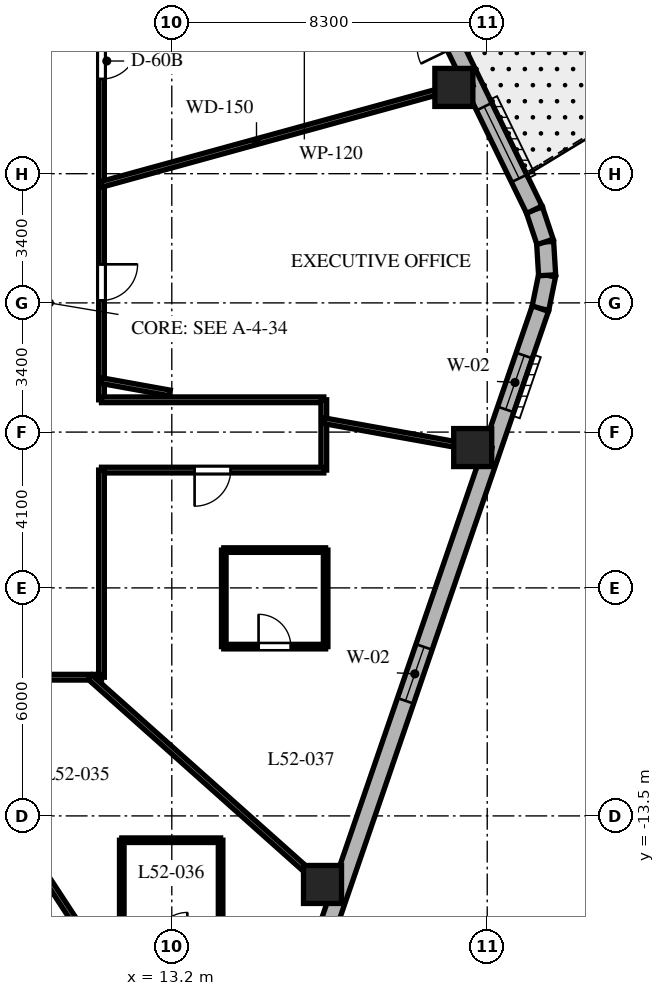
"""IFC4 building model, lengths in metres.
Left out: names, types, materials, properties, quantities, classifications, styles, units other than length and angle.
Written with IfcOpenShell. Run it as: python <this file> out.ifc"""

import sys

from ifc_helpers import new_model, si_unit, direction, frame, frame_2d, origin, origin_2d, place, context, subcontext, project, spatial, rectangle, extrude, element, fill, save


model = new_model("IFC4")
c1 = context("Model", 3, precision=1e-05, world=origin(), true_north=direction((0.0, 1.0)))
c2 = subcontext(c1, "Body", "Model", "MODEL_VIEW")
j1 = project(units=[si_unit("LENGTHUNIT", "METRE"), si_unit("PLANEANGLEUNIT", "RADIAN")], contexts=[c1])
p1 = place(None, origin())
s1 = spatial("IfcSite", under=j1, at=p1, CompositionType="ELEMENT")
p2 = place(p1, origin())
s2 = spatial("IfcBuilding", under=s1, at=p2, CompositionType="ELEMENT")
p3 = place(p2, frame((0.0, 0.0, 210.3)))
s3 = spatial("IfcBuildingStorey", under=s2, at=p3, CompositionType="ELEMENT", Elevation=210.3)
for number, where, z_axis, x_axis in (
    (1, (17.166, -15.304, 0.0), (0.0, 0.0, 1.0), (1.0, 0.0, 0.0)),
    (2, (21.118, -3.807, 0.0), (0.0, 0.0, 1.0), (1.0, 0.0, 0.0)),
    (3, (20.622, 5.67, 0.0), (0.0, 0.0, 1.0), (1.0, 0.0, 0.0)),
):
    element("IfcColumn", number, at=place(p3, frame(where, z_axis=z_axis, x_axis=x_axis)), inside=s3, PredefinedType="COLUMN", context=c2, shape_type="SweptSolid", body=[
        extrude(rectangle(XDim=1.0, YDim=1.0, at=origin_2d()), origin(), (0.0, 0.0, 1.0), 3.8),
    ])
p4 = place(p3, frame((22.898, -0.15, 0.0), z_axis=(0.0, 0.0, 1.0), x_axis=(0.199055826889, 0.979988151858, 0.0)))
e4 = element("IfcWall", 4, at=p4, inside=s3, PredefinedType="SOLIDWALL", context=c2, shape_type="SweptSolid", body=[
    extrude(rectangle(XDim=0.894, YDim=0.45, at=frame_2d((0.447, 0.0))), origin(), (0.0, 0.0, 1.0), 3.5),
])
p5 = place(p3, frame((23.076, 0.727, 0.0), z_axis=(0.0, 0.0, 1.0), x_axis=(-0.060805222108, 0.998149650586, 0.0)))
e5 = element("IfcWall", 5, at=p5, inside=s3, PredefinedType="SOLIDWALL", context=c2, shape_type="SweptSolid", body=[
    extrude(rectangle(XDim=0.879, YDim=0.45, at=frame_2d((0.44, 0.0))), origin(), (0.0, 0.0, 1.0), 3.5),
])
p6 = place(p3, frame((23.023, 1.604, 0.0), z_axis=(0.0, 0.0, 1.0), x_axis=(-0.316801227695, 0.948491951537, 0.0)))
e6 = element("IfcWall", 6, at=p6, inside=s3, PredefinedType="SOLIDWALL", context=c2, shape_type="SweptSolid", body=[
    extrude(rectangle(XDim=0.894, YDim=0.45, at=frame_2d((0.447, 0.0))), origin(), (0.0, 0.0, 1.0), 3.5),
])
p7 = place(p3, frame((16.324, -19.275, 0.0), z_axis=(0.0, 0.0, 1.0), x_axis=(0.325083142304, 0.945685439557, 0.0)))
e7 = element("IfcWall", 7, at=p7, inside=s3, PredefinedType="SOLIDWALL", context=c2, shape_type="SweptSolid", body=[
    extrude(rectangle(XDim=20.224, YDim=0.45, at=frame_2d((10.112, 0.0))), origin(), (0.0, 0.0, 1.0), 3.5),
])
p8 = place(p7, frame((1.253, 0.0, 0.8)))
e8 = element("IfcOpeningElement", 8, at=p8, cuts=e7, PredefinedType="OPENING", context=c2, shape_type="SweptSolid", body=[
    extrude(rectangle(XDim=1.5, YDim=1.8, at=frame_2d((0.75, 0.9))), frame((0.0, 0.235, 0.0), z_axis=(0.0, -1.0, 0.0), x_axis=(1.0, 0.0, 0.0)), (0.0, 0.0, 1.0), 0.47),
])
p9 = place(p7, frame((9.309, 0.0, 0.8)))
e9 = element("IfcOpeningElement", 9, at=p9, cuts=e7, PredefinedType="OPENING", context=c2, shape_type="SweptSolid", body=[
    extrude(rectangle(XDim=1.5, YDim=1.8, at=frame_2d((0.75, 0.9))), frame((0.0, 0.235, 0.0), z_axis=(0.0, -1.0, 0.0), x_axis=(1.0, 0.0, 0.0)), (0.0, 0.0, 1.0), 0.47),
])
p10 = place(p7, frame((17.418, 0.0, 0.8)))
e10 = element("IfcOpeningElement", 10, at=p10, cuts=e7, PredefinedType="OPENING", context=c2, shape_type="SweptSolid", body=[
    extrude(rectangle(XDim=1.5, YDim=1.8, at=frame_2d((0.75, 0.9))), frame((0.0, 0.235, 0.0), z_axis=(0.0, -1.0, 0.0), x_axis=(1.0, 0.0, 0.0)), (0.0, 0.0, 1.0), 0.47),
])
p11 = place(p3, frame((22.74, 2.452, 0.0), z_axis=(0.0, 0.0, 1.0), x_axis=(-0.437753424814, 0.899095066755, 0.0)))
e11 = element("IfcWall", 11, at=p11, inside=s3, PredefinedType="SOLIDWALL", context=c2, shape_type="SweptSolid", body=[
    extrude(rectangle(XDim=19.137, YDim=0.45, at=frame_2d((9.569, 0.0))), origin(), (0.0, 0.0, 1.0), 3.5),
])
p12 = place(p11, frame((4.763, 0.0, 0.0)))
e12 = element("IfcOpeningElement", 12, at=p12, cuts=e11, PredefinedType="OPENING", context=c2, shape_type="SweptSolid", body=[
    extrude(rectangle(XDim=1.0, YDim=2.15, at=frame_2d((0.5, 1.075))), frame((0.0, 0.235, 0.0), z_axis=(0.0, -1.0, 0.0), x_axis=(1.0, 0.0, 0.0)), (0.0, 0.0, 1.0), 0.47),
])
p13 = place(p11, frame((8.57, 0.0, 0.8)))
e13 = element("IfcOpeningElement", 13, at=p13, cuts=e11, PredefinedType="OPENING", context=c2, shape_type="SweptSolid", body=[
    extrude(rectangle(XDim=2.1, YDim=1.85, at=frame_2d((1.05, 0.925))), frame((0.0, 0.235, 0.0), z_axis=(0.0, -1.0, 0.0), x_axis=(1.0, 0.0, 0.0)), (0.0, 0.0, 1.0), 0.47),
])
p14 = place(p11, frame((16.173, 0.0, 0.8)))
e14 = element("IfcOpeningElement", 14, at=p14, cuts=e11, PredefinedType="OPENING", context=c2, shape_type="SweptSolid", body=[
    extrude(rectangle(XDim=2.1, YDim=1.85, at=frame_2d((1.05, 0.925))), frame((0.0, 0.235, 0.0), z_axis=(0.0, -1.0, 0.0), x_axis=(1.0, 0.0, 0.0)), (0.0, 0.0, 1.0), 0.47),
])
p15 = place(p11, frame((0.916, 0.0, 0.8)))
e15 = element("IfcOpeningElement", 15, at=p15, cuts=e11, PredefinedType="OPENING", context=c2, shape_type="SweptSolid", body=[
    extrude(rectangle(XDim=2.1, YDim=1.85, at=frame_2d((1.05, 0.925))), frame((0.0, 0.235, 0.0), z_axis=(0.0, -1.0, 0.0), x_axis=(1.0, 0.0, 0.0)), (0.0, 0.0, 1.0), 0.47),
])
p16 = place(p3, frame((11.35, 9.85, 0.0), z_axis=(0.0, 0.0, 1.0), x_axis=(0.0, -1.0, 0.0)))
e16 = element("IfcWall", 16, at=p16, inside=s3, PredefinedType="PARTITIONING", context=c2, shape_type="SweptSolid", body=[
    extrude(rectangle(XDim=12.4, YDim=0.15, at=frame_2d((6.2, 0.0))), origin(), (0.0, 0.0, 1.0), 2.99),
])
p17 = place(p16, frame((3.01, 0.0, 0.0)))
e17 = element("IfcOpeningElement", 17, at=p17, cuts=e16, PredefinedType="OPENING", context=c2, shape_type="SweptSolid", body=[
    extrude(rectangle(XDim=0.95, YDim=2.03, at=frame_2d((0.475, 1.015))), frame((0.0, 0.085, 0.0), z_axis=(0.0, -1.0, 0.0), x_axis=(1.0, 0.0, 0.0)), (0.0, 0.0, 1.0), 0.17),
])
p18 = place(p16, frame((8.835, 0.0, 0.0)))
e18 = element("IfcOpeningElement", 18, at=p18, cuts=e16, PredefinedType="OPENING", context=c2, shape_type="SweptSolid", body=[
    extrude(rectangle(XDim=0.95, YDim=2.03, at=frame_2d((0.475, 1.015))), frame((0.0, 0.085, 0.0), z_axis=(0.0, -1.0, 0.0), x_axis=(1.0, 0.0, 0.0)), (0.0, 0.0, 1.0), 0.17),
])
p19 = place(p3, frame((11.35, -2.55, 0.0), z_axis=(0.0, 0.0, 1.0), x_axis=(1.0, 0.0, 0.0)))
e19 = element("IfcWall", 19, at=p19, inside=s3, PredefinedType="PARTITIONING", context=c2, shape_type="SweptSolid", body=[
    extrude(rectangle(XDim=5.85, YDim=0.15, at=frame_2d((2.925, 0.0))), origin(), (0.0, 0.0, 1.0), 2.94),
])
p20 = place(p3, frame((17.2, -2.55, 0.0), z_axis=(0.0, 0.0, 1.0), x_axis=(0.0, -1.0, 0.0)))
e20 = element("IfcWall", 20, at=p20, inside=s3, PredefinedType="PARTITIONING", context=c2, shape_type="SweptSolid", body=[
    extrude(rectangle(XDim=1.85, YDim=0.15, at=frame_2d((0.925, 0.0))), origin(), (0.0, 0.0, 1.0), 2.94),
])
p21 = place(p3, frame((17.2, -4.4, 0.0), z_axis=(0.0, 0.0, 1.0), x_axis=(-1.0, 0.0, 0.0)))
e21 = element("IfcWall", 21, at=p21, inside=s3, PredefinedType="PARTITIONING", context=c2, shape_type="SweptSolid", body=[
    extrude(rectangle(XDim=5.85, YDim=0.15, at=frame_2d((2.925, 0.0))), origin(), (0.0, 0.0, 1.0), 2.94),
])
p22 = place(p21, frame((2.45, 0.0, 0.0)))
e22 = element("IfcOpeningElement", 22, at=p22, cuts=e21, PredefinedType="OPENING", context=c2, shape_type="SweptSolid", body=[
    extrude(rectangle(XDim=0.95, YDim=2.03, at=frame_2d((0.475, 1.015))), frame((0.0, 0.085, 0.0), z_axis=(0.0, -1.0, 0.0), x_axis=(1.0, 0.0, 0.0)), (0.0, 0.0, 1.0), 0.17),
])
p23 = place(p3, frame((11.35, -4.4, 0.0), z_axis=(0.0, 0.0, 1.0), x_axis=(0.0, -1.0, 0.0)))
e23 = element("IfcWall", 23, at=p23, inside=s3, PredefinedType="PARTITIONING", context=c2, shape_type="SweptSolid", body=[
    extrude(rectangle(XDim=5.45, YDim=0.15, at=frame_2d((2.725, 0.0))), origin(), (0.0, 0.0, 1.0), 2.99),
])
p24 = place(p3, frame((11.35, -9.85, 0.0), z_axis=(0.0, 0.0, 1.0), x_axis=(-1.0, 0.0, 0.0)))
e24 = element("IfcWall", 24, at=p24, inside=s3, PredefinedType="PARTITIONING", context=c2, shape_type="SweptSolid", body=[
    extrude(rectangle(XDim=10.43, YDim=0.15, at=frame_2d((5.215, 0.0))), origin(), (0.0, 0.0, 1.0), 2.99),
])
p25 = place(p24, frame((8.362, 0.0, 0.0)))
e25 = element("IfcOpeningElement", 25, at=p25, cuts=e24, PredefinedType="OPENING", context=c2, shape_type="SweptSolid", body=[
    extrude(rectangle(XDim=0.95, YDim=2.03, at=frame_2d((0.475, 1.015))), frame((0.0, 0.085, 0.0), z_axis=(0.0, -1.0, 0.0), x_axis=(1.0, 0.0, 0.0)), (0.0, 0.0, 1.0), 0.17),
])
p26 = place(p24, frame((5.73, 0.0, 0.0)))
e26 = element("IfcOpeningElement", 26, at=p26, cuts=e24, PredefinedType="OPENING", context=c2, shape_type="SweptSolid", body=[
    extrude(rectangle(XDim=0.9, YDim=2.03, at=frame_2d((0.45, 1.015))), frame((0.0, 0.085, 0.0), z_axis=(0.0, -1.0, 0.0), x_axis=(1.0, 0.0, 0.0)), (0.0, 0.0, 1.0), 0.17),
])
p27 = place(p24, frame((2.098, 0.0, 0.0)))
e27 = element("IfcOpeningElement", 27, at=p27, cuts=e24, PredefinedType="OPENING", context=c2, shape_type="SweptSolid", body=[
    extrude(rectangle(XDim=0.95, YDim=2.03, at=frame_2d((0.475, 1.015))), frame((0.0, 0.085, 0.0), z_axis=(0.0, -1.0, 0.0), x_axis=(1.0, 0.0, 0.0)), (0.0, 0.0, 1.0), 0.17),
])
p28 = place(p3, frame((11.35, 3.121, 0.0), z_axis=(0.0, 0.0, 1.0), x_axis=(0.964212793822, 0.265129568758, 0.0)))
e28 = element("IfcWall", 28, at=p28, inside=s3, PredefinedType="PARTITIONING", context=c2, shape_type="SweptSolid", body=[
    extrude(rectangle(XDim=10.12, YDim=0.15, at=frame_2d((5.06, 0.0))), origin(), (0.0, 0.0, 1.0), 2.74),
])
p29 = place(p3, frame((6.444, -9.85, 0.0), z_axis=(0.0, 0.0, 1.0), x_axis=(0.547492333129, -0.836810698525, 0.0)))
e29 = element("IfcWall", 29, at=p29, inside=s3, PredefinedType="PARTITIONING", context=c2, shape_type="SweptSolid", body=[
    extrude(rectangle(XDim=13.616, YDim=0.15, at=frame_2d((6.808, 0.0))), origin(), (0.0, 0.0, 1.0), 2.74),
])
p30 = place(p3, frame((11.048, -9.85, 0.0), z_axis=(0.0, 0.0, 1.0), x_axis=(0.746444434655, -0.665447748492, 0.0)))
e30 = element("IfcWall", 30, at=p30, inside=s3, PredefinedType="PARTITIONING", context=c2, shape_type="SweptSolid", body=[
    extrude(rectangle(XDim=8.732, YDim=0.15, at=frame_2d((4.366, 0.0))), origin(), (0.0, 0.0, 1.0), 2.74),
])
p31 = place(p3, frame((11.35, -2.046, 0.0), z_axis=(0.0, 0.0, 1.0), x_axis=(0.984127783205, -0.177461281195, 0.0)))
e31 = element("IfcWall", 31, at=p31, inside=s3, PredefinedType="PARTITIONING", context=c2, shape_type="SweptSolid", body=[
    extrude(rectangle(XDim=1.826, YDim=0.15, at=frame_2d((0.913, 0.0))), origin(), (0.0, 0.0, 1.0), 3.5),
])
p32 = place(p3, frame((17.2, -3.101, 0.0), z_axis=(0.0, 0.0, 1.0), x_axis=(0.98413465883, -0.177423147559, 0.0)))
e32 = element("IfcWall", 32, at=p32, inside=s3, PredefinedType="PARTITIONING", context=c2, shape_type="SweptSolid", body=[
    extrude(rectangle(XDim=4.482, YDim=0.15, at=frame_2d((2.241, 0.0))), origin(), (0.0, 0.0, 1.0), 2.74),
])
p33 = place(p3, frame((14.484, -16.89, 0.0), z_axis=(0.0, 0.0, 1.0), x_axis=(0.0, 1.0, 0.0)))
e33 = element("IfcWall", 33, at=p33, inside=s3, PredefinedType="PARTITIONING", context=c2, shape_type="SweptSolid", body=[
    extrude(rectangle(XDim=2.75, YDim=0.12, at=frame_2d((1.375, 0.0))), origin(), (0.0, 0.0, 1.0), 2.74),
])
p34 = place(p3, frame((14.484, -14.14, 0.0), z_axis=(0.0, 0.0, 1.0), x_axis=(-1.0, 0.0, 0.0)))
e34 = element("IfcWall", 34, at=p34, inside=s3, PredefinedType="PARTITIONING", context=c2, shape_type="SweptSolid", body=[
    extrude(rectangle(XDim=2.6, YDim=0.12, at=frame_2d((1.3, 0.0))), origin(), (0.0, 0.0, 1.0), 3.026),
])
p35 = place(p3, frame((11.884, -14.14, 0.0), z_axis=(0.0, 0.0, 1.0), x_axis=(0.0, -1.0, 0.0)))
e35 = element("IfcWall", 35, at=p35, inside=s3, PredefinedType="PARTITIONING", context=c2, shape_type="SweptSolid", body=[
    extrude(rectangle(XDim=2.75, YDim=0.12, at=frame_2d((1.375, 0.0))), origin(), (0.0, 0.0, 1.0), 3.026),
])
p36 = place(p3, frame((14.568, -9.045, 0.0), z_axis=(0.0, 0.0, 1.0), x_axis=(1.0, 0.0, 0.0)))
e36 = element("IfcWall", 36, at=p36, inside=s3, PredefinedType="PARTITIONING", context=c2, shape_type="SweptSolid", body=[
    extrude(rectangle(XDim=2.68, YDim=0.12, at=frame_2d((1.34, 0.0))), origin(), (0.0, 0.0, 1.0), 3.072),
])
p37 = place(p36, frame((0.915, 0.0, 0.0)))
e37 = element("IfcOpeningElement", 37, at=p37, cuts=e36, PredefinedType="OPENING", context=c2, shape_type="SweptSolid", body=[
    extrude(rectangle(XDim=0.85, YDim=2.03, at=frame_2d((0.425, 1.015))), frame((0.0, 0.07, 0.0), z_axis=(0.0, -1.0, 0.0), x_axis=(1.0, 0.0, 0.0)), (0.0, 0.0, 1.0), 0.14),
])
p38 = place(p3, frame((17.248, -9.045, 0.0), z_axis=(0.0, 0.0, 1.0), x_axis=(0.0, 1.0, 0.0)))
e38 = element("IfcWall", 38, at=p38, inside=s3, PredefinedType="PARTITIONING", context=c2, shape_type="SweptSolid", body=[
    extrude(rectangle(XDim=2.54, YDim=0.12, at=frame_2d((1.27, 0.0))), origin(), (0.0, 0.0, 1.0), 3.5),
])
p39 = place(p3, frame((17.248, -6.505, 0.0), z_axis=(0.0, 0.0, 1.0), x_axis=(-1.0, 0.0, 0.0)))
e39 = element("IfcWall", 39, at=p39, inside=s3, PredefinedType="PARTITIONING", context=c2, shape_type="SweptSolid", body=[
    extrude(rectangle(XDim=2.68, YDim=0.12, at=frame_2d((1.34, 0.0))), origin(), (0.0, 0.0, 1.0), 3.072),
])
p40 = place(p3, frame((14.568, -6.505, 0.0), z_axis=(0.0, 0.0, 1.0), x_axis=(0.0, -1.0, 0.0)))
e40 = element("IfcWall", 40, at=p40, inside=s3, PredefinedType="PARTITIONING", context=c2, shape_type="SweptSolid", body=[
    extrude(rectangle(XDim=2.54, YDim=0.12, at=frame_2d((1.27, 0.0))), origin(), (0.0, 0.0, 1.0), 3.5),
])
p41 = place(p9, origin())
e41 = element("IfcWindow", 41, at=p41, inside=s3, PartitioningType="SINGLE_PANEL", PredefinedType="WINDOW", context=c2, shape_type="SweptSolid", body=[
    extrude(rectangle(XDim=1.5, YDim=1.8, at=frame_2d((0.75, 0.9))), frame((0.0, 0.03, 0.0), z_axis=(0.0, -1.0, 0.0), x_axis=(1.0, 0.0, 0.0)), (0.0, 0.0, 1.0), 0.06),
])
fill(e9, e41)
p42 = place(p10, origin())
e42 = element("IfcWindow", 42, at=p42, inside=s3, PartitioningType="SINGLE_PANEL", PredefinedType="WINDOW", context=c2, shape_type="SweptSolid", body=[
    extrude(rectangle(XDim=1.5, YDim=1.8, at=frame_2d((0.75, 0.9))), frame((0.0, 0.03, 0.0), z_axis=(0.0, -1.0, 0.0), x_axis=(1.0, 0.0, 0.0)), (0.0, 0.0, 1.0), 0.06),
])
fill(e10, e42)
p43 = place(p15, origin())
e43 = element("IfcWindow", 43, at=p43, inside=s3, PartitioningType="SINGLE_PANEL", PredefinedType="WINDOW", context=c2, shape_type="SweptSolid", body=[
    extrude(rectangle(XDim=2.1, YDim=1.85, at=frame_2d((1.05, 0.925))), frame((0.0, 0.03, 0.0), z_axis=(0.0, -1.0, 0.0), x_axis=(1.0, 0.0, 0.0)), (0.0, 0.0, 1.0), 0.06),
])
fill(e15, e43)
p44 = place(p17, origin())
e44 = element("IfcDoor", 44, at=p44, inside=s3, OperationType="SINGLE_SWING_LEFT", PredefinedType="DOOR", context=c2, shape_type="SweptSolid", body=[
    extrude(rectangle(XDim=0.95, YDim=2.03, at=frame_2d((0.475, 1.015))), frame((0.0, 0.025, 0.0), z_axis=(0.0, -1.0, 0.0), x_axis=(1.0, 0.0, 0.0)), (0.0, 0.0, 1.0), 0.05),
])
fill(e17, e44)
p45 = place(p22, origin())
e45 = element("IfcDoor", 45, at=p45, inside=s3, OperationType="SINGLE_SWING_RIGHT", PredefinedType="DOOR", context=c2, shape_type="SweptSolid", body=[
    extrude(rectangle(XDim=0.95, YDim=2.03, at=frame_2d((0.475, 1.015))), frame((0.0, 0.025, 0.0), z_axis=(0.0, -1.0, 0.0), x_axis=(1.0, 0.0, 0.0)), (0.0, 0.0, 1.0), 0.05),
])
fill(e22, e45)
p46 = place(p37, origin())
e46 = element("IfcDoor", 46, at=p46, inside=s3, OperationType="SINGLE_SWING_LEFT", PredefinedType="DOOR", context=c2, shape_type="SweptSolid", body=[
    extrude(rectangle(XDim=0.85, YDim=2.03, at=frame_2d((0.425, 1.015))), frame((0.0, 0.025, 0.0), z_axis=(0.0, -1.0, 0.0), x_axis=(1.0, 0.0, 0.0)), (0.0, 0.0, 1.0), 0.05),
])
fill(e37, e46)
p47 = place(p18, origin())
e47 = element("IfcDoor", 47, at=p47, inside=s3, OperationType="SINGLE_SWING_LEFT", PredefinedType="DOOR", context=c2, shape_type="SweptSolid", body=[
    extrude(rectangle(XDim=0.95, YDim=2.03, at=frame_2d((0.475, 1.015))), frame((0.0, 0.025, 0.0), z_axis=(0.0, -1.0, 0.0), x_axis=(1.0, 0.0, 0.0)), (0.0, 0.0, 1.0), 0.05),
])
fill(e18, e47)
save(model, sys.argv[1])
